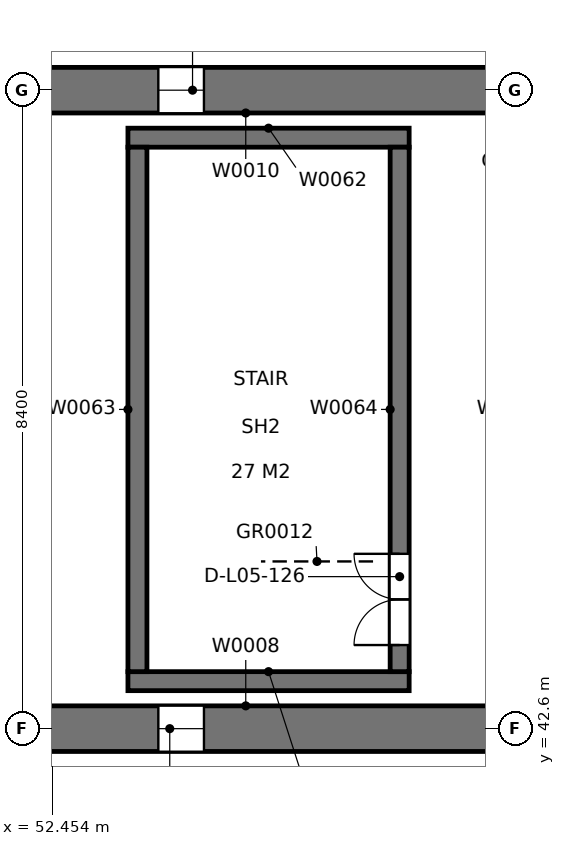
"""IFC4 building model, lengths in metres.
Left out: names, types, materials, properties, quantities, classifications, styles, units other than length and angle.
Written with IfcOpenShell. Run it as: python <this file> out.ifc"""

import sys

from ifc_helpers import new_model, si_unit, direction, frame, frame_2d, origin, place, context, subcontext, project, spatial, rectangle, extrude, element, fill, save


model = new_model("IFC4")
c1 = context("Model", 3, precision=1e-05, world=origin(), true_north=direction((0.0, 1.0)))
c2 = subcontext(c1, "Body", "Model", "MODEL_VIEW")
j1 = project(units=[si_unit("LENGTHUNIT", "METRE"), si_unit("PLANEANGLEUNIT", "RADIAN")], contexts=[c1])
p1 = place(None, origin())
s1 = spatial("IfcSite", under=j1, at=p1, CompositionType="ELEMENT")
p2 = place(p1, origin())
s2 = spatial("IfcBuilding", under=s1, at=p2, CompositionType="ELEMENT")
p3 = place(p2, frame((0.0, 0.0, 24.0)))
s3 = spatial("IfcBuildingStorey", under=s2, at=p3, CompositionType="ELEMENT", Elevation=24.0)
p4 = place(p3, frame((51.3, 42.6, 0.0), z_axis=(0.0, 0.0, 1.0), x_axis=(1.0, 0.0, 0.0)))
e1 = element("IfcWall", 1, at=p4, inside=s3, PredefinedType="SOLIDWALL", context=c2, shape_type="SweptSolid", body=[
    extrude(rectangle(XDim=7.4, YDim=0.6, at=frame_2d((3.7, 0.0))), origin(), (0.0, 0.0, 1.0), 4.8),
])
p5 = place(p4, frame((2.55, 0.0, 1.5)))
e2 = element("IfcOpeningElement", 2, at=p5, cuts=e1, PredefinedType="OPENING", context=c2, shape_type="SweptSolid", body=[
    extrude(rectangle(XDim=0.6, YDim=1.8, at=frame_2d((0.3, 0.9))), frame((0.0, 0.31, 0.0), z_axis=(0.0, -1.0, 0.0), x_axis=(1.0, 0.0, 0.0)), (0.0, 0.0, 1.0), 0.62),
])
p6 = place(p3, frame((58.7, 51.0, 0.0), z_axis=(0.0, 0.0, 1.0), x_axis=(-1.0, 0.0, 0.0)))
e3 = element("IfcWall", 3, at=p6, inside=s3, PredefinedType="SOLIDWALL", context=c2, shape_type="SweptSolid", body=[
    extrude(rectangle(XDim=7.4, YDim=0.6, at=frame_2d((3.7, 0.0))), origin(), (0.0, 0.0, 1.0), 4.8),
])
p7 = place(p6, frame((4.25, 0.0, 1.5)))
e4 = element("IfcOpeningElement", 4, at=p7, cuts=e3, PredefinedType="OPENING", context=c2, shape_type="SweptSolid", body=[
    extrude(rectangle(XDim=0.6, YDim=1.8, at=frame_2d((0.3, 0.9))), frame((0.0, 0.31, 0.0), z_axis=(0.0, -1.0, 0.0), x_axis=(1.0, 0.0, 0.0)), (0.0, 0.0, 1.0), 0.62),
])
for number, where, z_axis, x_axis in (
    (5, (53.45, 43.225, 0.0), (0.0, 0.0, 1.0), (1.0, 0.0, 0.0)),
    (6, (53.45, 50.375, 0.0), (0.0, 0.0, 1.0), (1.0, 0.0, 0.0)),
):
    element("IfcWall", number, at=place(p3, frame(where, z_axis=z_axis, x_axis=x_axis)), inside=s3, PredefinedType="SOLIDWALL", context=c2, shape_type="SweptSolid", body=[
        extrude(rectangle(XDim=3.7, YDim=0.25, at=frame_2d((1.85, 0.0))), origin(), (0.0, 0.0, 1.0), 4.8),
    ])
p8 = place(p3, frame((53.575, 43.35, 0.0), z_axis=(0.0, 0.0, 1.0), x_axis=(0.0, 1.0, 0.0)))
e7 = element("IfcWall", 7, at=p8, inside=s3, PredefinedType="SOLIDWALL", context=c2, shape_type="SweptSolid", body=[
    extrude(rectangle(XDim=6.9, YDim=0.25, at=frame_2d((3.45, 0.0))), origin(), (0.0, 0.0, 1.0), 4.8),
])
p9 = place(p3, frame((57.025, 43.35, 0.0), z_axis=(0.0, 0.0, 1.0), x_axis=(0.0, 1.0, 0.0)))
e8 = element("IfcWall", 8, at=p9, inside=s3, PredefinedType="SOLIDWALL", context=c2, shape_type="SweptSolid", body=[
    extrude(rectangle(XDim=6.9, YDim=0.25, at=frame_2d((3.45, 0.0))), origin(), (0.0, 0.0, 1.0), 4.8),
])
p10 = place(p9, frame((0.35, 0.0, 0.0)))
e9 = element("IfcOpeningElement", 9, at=p10, cuts=e8, PredefinedType="OPENING", context=c2, shape_type="SweptSolid", body=[
    extrude(rectangle(XDim=1.2, YDim=2.1, at=frame_2d((0.6, 1.05))), frame((0.0, 0.135, 0.0), z_axis=(0.0, -1.0, 0.0), x_axis=(1.0, 0.0, 0.0)), (0.0, 0.0, 1.0), 0.27),
])
p11 = place(p10, origin())
e10 = element("IfcDoor", 10, at=p11, inside=s3, OperationType="DOUBLE_DOOR_SINGLE_SWING", PredefinedType="DOOR", context=c2, shape_type="SweptSolid", body=[
    extrude(rectangle(XDim=1.2, YDim=2.1, at=frame_2d((0.6, 1.05))), frame((0.0, 0.025, 0.0), z_axis=(0.0, -1.0, 0.0), x_axis=(1.0, 0.0, 0.0)), (0.0, 0.0, 1.0), 0.05),
])
fill(e9, e10)
p12 = place(p5, origin())
e11 = element("IfcWindow", 11, at=p12, inside=s3, PartitioningType="SINGLE_PANEL", PredefinedType="WINDOW", context=c2, shape_type="SweptSolid", body=[
    extrude(rectangle(XDim=0.6, YDim=1.8, at=frame_2d((0.3, 0.9))), frame((0.0, 0.01, 0.0), z_axis=(0.0, -1.0, 0.0), x_axis=(1.0, 0.0, 0.0)), (0.0, 0.0, 1.0), 0.06),
])
fill(e2, e11)
p13 = place(p7, origin())
e12 = element("IfcWindow", 12, at=p13, inside=s3, PartitioningType="SINGLE_PANEL", PredefinedType="WINDOW", context=c2, shape_type="SweptSolid", body=[
    extrude(rectangle(XDim=0.6, YDim=1.8, at=frame_2d((0.3, 0.9))), frame((0.0, 0.01, 0.0), z_axis=(0.0, -1.0, 0.0), x_axis=(1.0, 0.0, 0.0)), (0.0, 0.0, 1.0), 0.06),
])
fill(e4, e12)
save(model, sys.argv[1])
